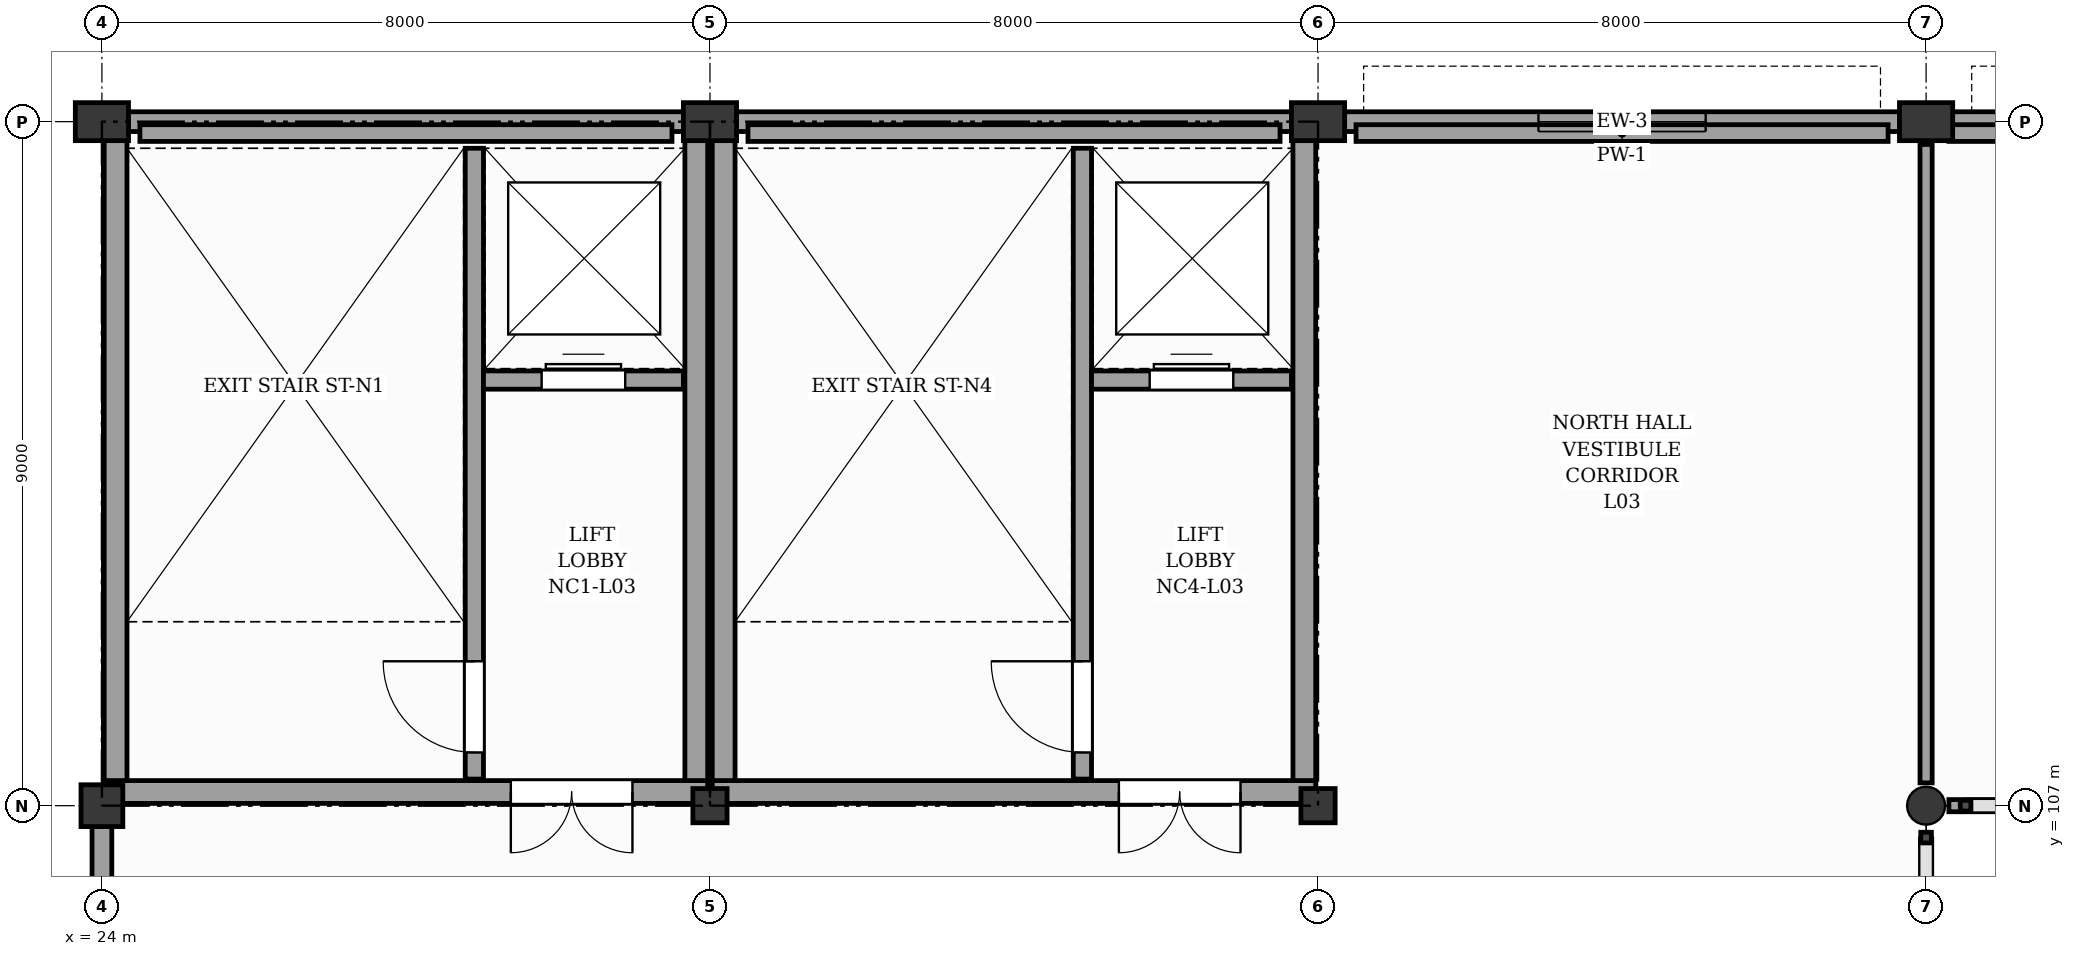
"""IFC4 building model, lengths in metres.
Left out: names, types, materials, properties, quantities, classifications, styles, units other than length and angle.
Written with IfcOpenShell. Run it as: python <this file> out.ifc"""

import sys

from ifc_helpers import new_model, si_unit, direction, frame, frame_2d, origin, origin_2d, place, context, subcontext, project, spatial, rectangle, circle, extrude, element, fill, save


model = new_model("IFC4")
c1 = context("Model", 3, precision=1e-05, world=origin(), true_north=direction((0.0, 1.0)))
c2 = subcontext(c1, "Body", "Model", "MODEL_VIEW")
j1 = project(units=[si_unit("LENGTHUNIT", "METRE"), si_unit("PLANEANGLEUNIT", "RADIAN")], contexts=[c1])
p1 = place(None, origin())
s1 = spatial("IfcSite", under=j1, at=p1, CompositionType="ELEMENT")
p2 = place(p1, origin())
s2 = spatial("IfcBuilding", under=s1, at=p2, CompositionType="ELEMENT")
p3 = place(p2, frame((0.0, 0.0, 16.2)))
s3 = spatial("IfcBuildingStorey", under=s2, at=p3, CompositionType="ELEMENT", Elevation=16.2)
p4 = place(p3, frame((24.0, 107.0, 0.0), z_axis=(0.0, 0.0, 1.0), x_axis=(1.0, 0.0, 0.0)))
e1 = element("IfcColumn", 1, at=p4, inside=s3, PredefinedType="COLUMN", context=c2, shape_type="SweptSolid", body=[
    extrude(rectangle(XDim=0.55, YDim=0.55, at=origin_2d()), origin(), (0.0, 0.0, 1.0), 4.2),
])
p5 = place(p3, frame((24.0, 116.0, 0.0), z_axis=(0.0, 0.0, 1.0), x_axis=(1.0, 0.0, 0.0)))
e2 = element("IfcColumn", 2, at=p5, inside=s3, PredefinedType="PILASTER", context=c2, shape_type="SweptSolid", body=[
    extrude(rectangle(XDim=0.7, YDim=0.5, at=origin_2d()), origin(), (0.0, 0.0, 1.0), 4.2),
])
p6 = place(p3, frame((32.0, 107.0, 0.0), z_axis=(0.0, 0.0, 1.0), x_axis=(1.0, 0.0, 0.0)))
e3 = element("IfcColumn", 3, at=p6, inside=s3, PredefinedType="COLUMN", context=c2, shape_type="SweptSolid", body=[
    extrude(rectangle(XDim=0.45, YDim=0.45, at=origin_2d()), origin(), (0.0, 0.0, 1.0), 4.2),
])
p7 = place(p3, frame((32.0, 116.0, 0.0), z_axis=(0.0, 0.0, 1.0), x_axis=(1.0, 0.0, 0.0)))
e4 = element("IfcColumn", 4, at=p7, inside=s3, PredefinedType="PILASTER", context=c2, shape_type="SweptSolid", body=[
    extrude(rectangle(XDim=0.7, YDim=0.5, at=origin_2d()), origin(), (0.0, 0.0, 1.0), 4.2),
])
p8 = place(p3, frame((40.0, 107.0, 0.0), z_axis=(0.0, 0.0, 1.0), x_axis=(1.0, 0.0, 0.0)))
e5 = element("IfcColumn", 5, at=p8, inside=s3, PredefinedType="COLUMN", context=c2, shape_type="SweptSolid", body=[
    extrude(rectangle(XDim=0.45, YDim=0.45, at=origin_2d()), origin(), (0.0, 0.0, 1.0), 4.2),
])
p9 = place(p3, frame((40.0, 116.0, 0.0), z_axis=(0.0, 0.0, 1.0), x_axis=(1.0, 0.0, 0.0)))
e6 = element("IfcColumn", 6, at=p9, inside=s3, PredefinedType="PILASTER", context=c2, shape_type="SweptSolid", body=[
    extrude(rectangle(XDim=0.7, YDim=0.5, at=origin_2d()), origin(), (0.0, 0.0, 1.0), 4.2),
])
p10 = place(p3, frame((48.0, 107.0, 0.0), z_axis=(0.0, 0.0, 1.0), x_axis=(1.0, 0.0, 0.0)))
e7 = element("IfcColumn", 7, at=p10, inside=s3, PredefinedType="COLUMN", context=c2, shape_type="SweptSolid", body=[
    extrude(circle(Radius=0.25, at=origin_2d()), origin(), (0.0, 0.0, 1.0), 4.2),
])
p11 = place(p3, frame((48.0, 116.0, 0.0), z_axis=(0.0, 0.0, 1.0), x_axis=(1.0, 0.0, 0.0)))
e8 = element("IfcColumn", 8, at=p11, inside=s3, PredefinedType="PILASTER", context=c2, shape_type="SweptSolid", body=[
    extrude(rectangle(XDim=0.7, YDim=0.5, at=origin_2d()), origin(), (0.0, 0.0, 1.0), 4.2),
])
for number, where, z_axis, x_axis in (
    (9, (24.345, 116.0, 0.0), (0.0, 0.0, 1.0), (1.0, 0.0, 0.0)),
    (10, (32.345, 116.0, 0.0), (0.0, 0.0, 1.0), (1.0, 0.0, 0.0)),
):
    element("IfcWall", number, at=place(p3, frame(where, z_axis=z_axis, x_axis=x_axis)), inside=s3, PredefinedType="SOLIDWALL", context=c2, shape_type="SweptSolid", body=[
        extrude(rectangle(XDim=7.31, YDim=0.26, at=frame_2d((3.655, 0.0))), origin(), (0.0, 0.0, 1.0), 3.24),
    ])
p12 = place(p3, frame((40.345, 116.0, 0.0), z_axis=(0.0, 0.0, 1.0), x_axis=(1.0, 0.0, 0.0)))
e11 = element("IfcWall", 11, at=p12, inside=s3, PredefinedType="SOLIDWALL", context=c2, shape_type="SweptSolid", body=[
    extrude(rectangle(XDim=7.31, YDim=0.26, at=frame_2d((3.655, 0.0))), origin(), (0.0, 0.0, 1.0), 3.21),
])
p13 = place(p12, frame((2.555, 0.0, 0.9)))
e12 = element("IfcOpeningElement", 12, at=p13, cuts=e11, PredefinedType="OPENING", context=c2, shape_type="SweptSolid", body=[
    extrude(rectangle(XDim=2.2, YDim=1.99, at=frame_2d((1.1, 0.995))), frame((0.0, 0.14, 0.0), z_axis=(0.0, -1.0, 0.0), x_axis=(1.0, 0.0, 0.0)), (0.0, 0.0, 1.0), 0.28),
])
p14 = place(p3, frame((48.345, 116.0, 0.0), z_axis=(0.0, 0.0, 1.0), x_axis=(1.0, 0.0, 0.0)))
e13 = element("IfcWall", 13, at=p14, inside=s3, PredefinedType="SOLIDWALL", context=c2, shape_type="SweptSolid", body=[
    extrude(rectangle(XDim=7.31, YDim=0.26, at=frame_2d((3.655, 0.0))), origin(), (0.0, 0.0, 1.0), 3.21),
])
p15 = place(p14, frame((2.555, 0.0, 0.9)))
e14 = element("IfcOpeningElement", 14, at=p15, cuts=e13, PredefinedType="OPENING", context=c2, shape_type="SweptSolid", body=[
    extrude(rectangle(XDim=2.2, YDim=1.99, at=frame_2d((1.1, 0.995))), frame((0.0, 0.14, 0.0), z_axis=(0.0, -1.0, 0.0), x_axis=(1.0, 0.0, 0.0)), (0.0, 0.0, 1.0), 0.28),
])
p16 = place(p3, frame((24.0, 98.27, 0.0), z_axis=(0.0, 0.0, 1.0), x_axis=(0.0, 1.0, 0.0)))
e15 = element("IfcWall", 15, at=p16, inside=s3, PredefinedType="SOLIDWALL", context=c2, shape_type="SweptSolid", body=[
    extrude(rectangle(XDim=8.46, YDim=0.26, at=frame_2d((4.23, 0.0))), origin(), (0.0, 0.0, 1.0), 3.24),
])
p17 = place(p16, frame((3.43, 0.0, 0.95)))
e16 = element("IfcOpeningElement", 16, at=p17, cuts=e15, PredefinedType="OPENING", context=c2, shape_type="SweptSolid", body=[
    extrude(rectangle(XDim=1.6, YDim=2.1, at=frame_2d((0.8, 1.05))), frame((0.0, 0.14, 0.0), z_axis=(0.0, -1.0, 0.0), x_axis=(1.0, 0.0, 0.0)), (0.0, 0.0, 1.0), 0.28),
])
for number, where, z_axis, x_axis in (
    (17, (24.5, 115.85, 4.2), (0.0, 0.0, 1.0), (1.0, 0.0, 0.0)),
    (18, (32.5, 115.85, 4.2), (0.0, 0.0, 1.0), (1.0, 0.0, 0.0)),
    (19, (40.5, 115.85, 4.2), (0.0, 0.0, 1.0), (1.0, 0.0, 0.0)),
):
    element("IfcWall", number, at=place(p3, frame(where, z_axis=z_axis, x_axis=x_axis)), inside=s3, PredefinedType="PARAPET", context=c2, shape_type="SweptSolid", body=[
        extrude(rectangle(XDim=7.0, YDim=0.22, at=frame_2d((3.5, 0.0))), origin(), (0.0, 0.0, 1.0), 0.95),
    ])
p18 = place(p3, frame((48.3, 115.85, 4.2), z_axis=(0.0, 0.0, 1.0), x_axis=(1.0, 0.0, 0.0)))
e20 = element("IfcWall", 20, at=p18, inside=s3, PredefinedType="PARAPET", context=c2, shape_type="SweptSolid", body=[
    extrude(rectangle(XDim=2.9, YDim=0.22, at=frame_2d((1.45, 0.0))), origin(), (0.0, 0.0, 1.0), 0.95),
])
p19 = place(p3, frame((28.9, 107.35, 0.0), z_axis=(0.0, 0.0, 1.0), x_axis=(0.0, 1.0, 0.0)))
e21 = element("IfcWall", 21, at=p19, inside=s3, PredefinedType="SHEAR", context=c2, shape_type="SweptSolid", body=[
    extrude(rectangle(XDim=8.3, YDim=0.24, at=frame_2d((4.15, 0.0))), origin(), (0.0, 0.0, 1.0), 3.98),
])
p20 = place(p19, frame((0.35, 0.0, 0.0)))
e22 = element("IfcOpeningElement", 22, at=p20, cuts=e21, PredefinedType="OPENING", context=c2, shape_type="SweptSolid", body=[
    extrude(rectangle(XDim=1.2, YDim=2.15, at=frame_2d((0.6, 1.075))), frame((0.0, 0.13, 0.0), z_axis=(0.0, -1.0, 0.0), x_axis=(1.0, 0.0, 0.0)), (0.0, 0.0, 1.0), 0.26),
])
p21 = place(p3, frame((29.02, 112.6, 0.0), z_axis=(0.0, 0.0, 1.0), x_axis=(1.0, 0.0, 0.0)))
e23 = element("IfcWall", 23, at=p21, inside=s3, PredefinedType="SHEAR", context=c2, shape_type="SweptSolid", body=[
    extrude(rectangle(XDim=2.63, YDim=0.24, at=frame_2d((1.315, 0.0))), origin(), (0.0, 0.0, 1.0), 3.98),
])
p22 = place(p21, frame((0.765, 0.0, 0.0)))
e24 = element("IfcOpeningElement", 24, at=p22, cuts=e23, PredefinedType="OPENING", context=c2, shape_type="SweptSolid", body=[
    extrude(rectangle(XDim=1.1, YDim=2.15, at=frame_2d((0.55, 1.075))), frame((0.0, 0.13, 0.0), z_axis=(0.0, -1.0, 0.0), x_axis=(1.0, 0.0, 0.0)), (0.0, 0.0, 1.0), 0.26),
])
for number, where, z_axis, x_axis in (
    (25, (24.18, 107.18, 0.0), (0.0, 0.0, 1.0), (0.0, 1.0, 0.0)),
    (26, (31.82, 107.18, 0.0), (0.0, 0.0, 1.0), (0.0, 1.0, 0.0)),
):
    element("IfcWall", number, at=place(p3, frame(where, z_axis=z_axis, x_axis=x_axis)), inside=s3, PredefinedType="SHEAR", context=c2, shape_type="SweptSolid", body=[
        extrude(rectangle(XDim=8.64, YDim=0.3, at=frame_2d((4.32, 0.0))), origin(), (0.0, 0.0, 1.0), 3.98),
    ])
p23 = place(p3, frame((24.03, 107.18, 0.0), z_axis=(0.0, 0.0, 1.0), x_axis=(1.0, 0.0, 0.0)))
e27 = element("IfcWall", 27, at=p23, inside=s3, PredefinedType="SHEAR", context=c2, shape_type="SweptSolid", body=[
    extrude(rectangle(XDim=7.94, YDim=0.3, at=frame_2d((3.97, 0.0))), origin(), (0.0, 0.0, 1.0), 3.98),
])
p24 = place(p23, frame((5.35, 0.0, 0.0)))
e28 = element("IfcOpeningElement", 28, at=p24, cuts=e27, PredefinedType="OPENING", context=c2, shape_type="SweptSolid", body=[
    extrude(rectangle(XDim=1.6, YDim=2.15, at=frame_2d((0.8, 1.075))), frame((0.0, 0.16, 0.0), z_axis=(0.0, -1.0, 0.0), x_axis=(1.0, 0.0, 0.0)), (0.0, 0.0, 1.0), 0.32),
])
p25 = place(p3, frame((36.9, 107.35, 0.0), z_axis=(0.0, 0.0, 1.0), x_axis=(0.0, 1.0, 0.0)))
e29 = element("IfcWall", 29, at=p25, inside=s3, PredefinedType="SHEAR", context=c2, shape_type="SweptSolid", body=[
    extrude(rectangle(XDim=8.3, YDim=0.24, at=frame_2d((4.15, 0.0))), origin(), (0.0, 0.0, 1.0), 3.98),
])
p26 = place(p25, frame((0.35, 0.0, 0.0)))
e30 = element("IfcOpeningElement", 30, at=p26, cuts=e29, PredefinedType="OPENING", context=c2, shape_type="SweptSolid", body=[
    extrude(rectangle(XDim=1.2, YDim=2.15, at=frame_2d((0.6, 1.075))), frame((0.0, 0.13, 0.0), z_axis=(0.0, -1.0, 0.0), x_axis=(1.0, 0.0, 0.0)), (0.0, 0.0, 1.0), 0.26),
])
p27 = place(p3, frame((37.02, 112.6, 0.0), z_axis=(0.0, 0.0, 1.0), x_axis=(1.0, 0.0, 0.0)))
e31 = element("IfcWall", 31, at=p27, inside=s3, PredefinedType="SHEAR", context=c2, shape_type="SweptSolid", body=[
    extrude(rectangle(XDim=2.63, YDim=0.24, at=frame_2d((1.315, 0.0))), origin(), (0.0, 0.0, 1.0), 3.98),
])
p28 = place(p27, frame((0.765, 0.0, 0.0)))
e32 = element("IfcOpeningElement", 32, at=p28, cuts=e31, PredefinedType="OPENING", context=c2, shape_type="SweptSolid", body=[
    extrude(rectangle(XDim=1.1, YDim=2.15, at=frame_2d((0.55, 1.075))), frame((0.0, 0.13, 0.0), z_axis=(0.0, -1.0, 0.0), x_axis=(1.0, 0.0, 0.0)), (0.0, 0.0, 1.0), 0.26),
])
for number, where, z_axis, x_axis in (
    (33, (32.18, 107.18, 0.0), (0.0, 0.0, 1.0), (0.0, 1.0, 0.0)),
    (34, (39.82, 107.18, 0.0), (0.0, 0.0, 1.0), (0.0, 1.0, 0.0)),
):
    element("IfcWall", number, at=place(p3, frame(where, z_axis=z_axis, x_axis=x_axis)), inside=s3, PredefinedType="SHEAR", context=c2, shape_type="SweptSolid", body=[
        extrude(rectangle(XDim=8.64, YDim=0.3, at=frame_2d((4.32, 0.0))), origin(), (0.0, 0.0, 1.0), 3.98),
    ])
p29 = place(p3, frame((32.03, 107.18, 0.0), z_axis=(0.0, 0.0, 1.0), x_axis=(1.0, 0.0, 0.0)))
e35 = element("IfcWall", 35, at=p29, inside=s3, PredefinedType="SHEAR", context=c2, shape_type="SweptSolid", body=[
    extrude(rectangle(XDim=7.94, YDim=0.3, at=frame_2d((3.97, 0.0))), origin(), (0.0, 0.0, 1.0), 3.98),
])
p30 = place(p29, frame((5.35, 0.0, 0.0)))
e36 = element("IfcOpeningElement", 36, at=p30, cuts=e35, PredefinedType="OPENING", context=c2, shape_type="SweptSolid", body=[
    extrude(rectangle(XDim=1.6, YDim=2.15, at=frame_2d((0.8, 1.075))), frame((0.0, 0.16, 0.0), z_axis=(0.0, -1.0, 0.0), x_axis=(1.0, 0.0, 0.0)), (0.0, 0.0, 1.0), 0.32),
])
p31 = place(p3, frame((48.3, 107.0, 0.0), z_axis=(0.0, 0.0, 1.0), x_axis=(1.0, 0.0, 0.0)))
e37 = element("IfcWall", 37, at=p31, inside=s3, PredefinedType="PARTITIONING", context=c2, shape_type="SweptSolid", body=[
    extrude(rectangle(XDim=7.4, YDim=0.16, at=frame_2d((3.7, 0.0))), origin(), (0.0, 0.0, 1.0), 3.1),
])
p32 = place(p3, frame((48.0, 107.3, 0.0), z_axis=(0.0, 0.0, 1.0), x_axis=(0.0, 1.0, 0.0)))
e38 = element("IfcWall", 38, at=p32, inside=s3, PredefinedType="PARTITIONING", context=c2, shape_type="SweptSolid", body=[
    extrude(rectangle(XDim=8.4, YDim=0.16, at=frame_2d((4.2, 0.0))), origin(), (0.0, 0.0, 1.0), 3.1),
])
p33 = place(p13, origin())
e39 = element("IfcWindow", 39, at=p33, inside=s3, PartitioningType="SINGLE_PANEL", PredefinedType="WINDOW", context=c2, shape_type="SweptSolid", body=[
    extrude(rectangle(XDim=2.2, YDim=1.99, at=frame_2d((1.1, 0.995))), frame((0.0, 0.03, 0.0), z_axis=(0.0, -1.0, 0.0), x_axis=(1.0, 0.0, 0.0)), (0.0, 0.0, 1.0), 0.06),
])
fill(e12, e39)
p34 = place(p20, origin())
e40 = element("IfcDoor", 40, at=p34, inside=s3, OperationType="SINGLE_SWING_RIGHT", PredefinedType="DOOR", context=c2, shape_type="SweptSolid", body=[
    extrude(rectangle(XDim=1.2, YDim=2.15, at=frame_2d((0.6, 1.075))), frame((0.0, 0.025, 0.0), z_axis=(0.0, -1.0, 0.0), x_axis=(1.0, 0.0, 0.0)), (0.0, 0.0, 1.0), 0.05),
])
fill(e22, e40)
p35 = place(p22, origin())
e41 = element("IfcDoor", 41, at=p35, inside=s3, OperationType="DOUBLE_DOOR_SLIDING", PredefinedType="DOOR", context=c2, shape_type="SweptSolid", body=[
    extrude(rectangle(XDim=1.1, YDim=2.15, at=frame_2d((0.55, 1.075))), frame((0.0, 0.025, 0.0), z_axis=(0.0, -1.0, 0.0), x_axis=(1.0, 0.0, 0.0)), (0.0, 0.0, 1.0), 0.05),
])
fill(e24, e41)
p36 = place(p24, frame((1.6, 0.0, 0.0), z_axis=(0.0, 0.0, 1.0), x_axis=(-1.0, 0.0, 0.0)))
e42 = element("IfcDoor", 42, at=p36, inside=s3, OperationType="DOUBLE_DOOR_SINGLE_SWING", PredefinedType="DOOR", context=c2, shape_type="SweptSolid", body=[
    extrude(rectangle(XDim=1.6, YDim=2.15, at=frame_2d((0.8, 1.075))), frame((0.0, 0.025, 0.0), z_axis=(0.0, -1.0, 0.0), x_axis=(1.0, 0.0, 0.0)), (0.0, 0.0, 1.0), 0.05),
])
fill(e28, e42)
p37 = place(p26, origin())
e43 = element("IfcDoor", 43, at=p37, inside=s3, OperationType="SINGLE_SWING_RIGHT", PredefinedType="DOOR", context=c2, shape_type="SweptSolid", body=[
    extrude(rectangle(XDim=1.2, YDim=2.15, at=frame_2d((0.6, 1.075))), frame((0.0, 0.025, 0.0), z_axis=(0.0, -1.0, 0.0), x_axis=(1.0, 0.0, 0.0)), (0.0, 0.0, 1.0), 0.05),
])
fill(e30, e43)
p38 = place(p28, origin())
e44 = element("IfcDoor", 44, at=p38, inside=s3, OperationType="DOUBLE_DOOR_SLIDING", PredefinedType="DOOR", context=c2, shape_type="SweptSolid", body=[
    extrude(rectangle(XDim=1.1, YDim=2.15, at=frame_2d((0.55, 1.075))), frame((0.0, 0.025, 0.0), z_axis=(0.0, -1.0, 0.0), x_axis=(1.0, 0.0, 0.0)), (0.0, 0.0, 1.0), 0.05),
])
fill(e32, e44)
p39 = place(p30, frame((1.6, 0.0, 0.0), z_axis=(0.0, 0.0, 1.0), x_axis=(-1.0, 0.0, 0.0)))
e45 = element("IfcDoor", 45, at=p39, inside=s3, OperationType="DOUBLE_DOOR_SINGLE_SWING", PredefinedType="DOOR", context=c2, shape_type="SweptSolid", body=[
    extrude(rectangle(XDim=1.6, YDim=2.15, at=frame_2d((0.8, 1.075))), frame((0.0, 0.025, 0.0), z_axis=(0.0, -1.0, 0.0), x_axis=(1.0, 0.0, 0.0)), (0.0, 0.0, 1.0), 0.05),
])
fill(e36, e45)
save(model, sys.argv[1])
